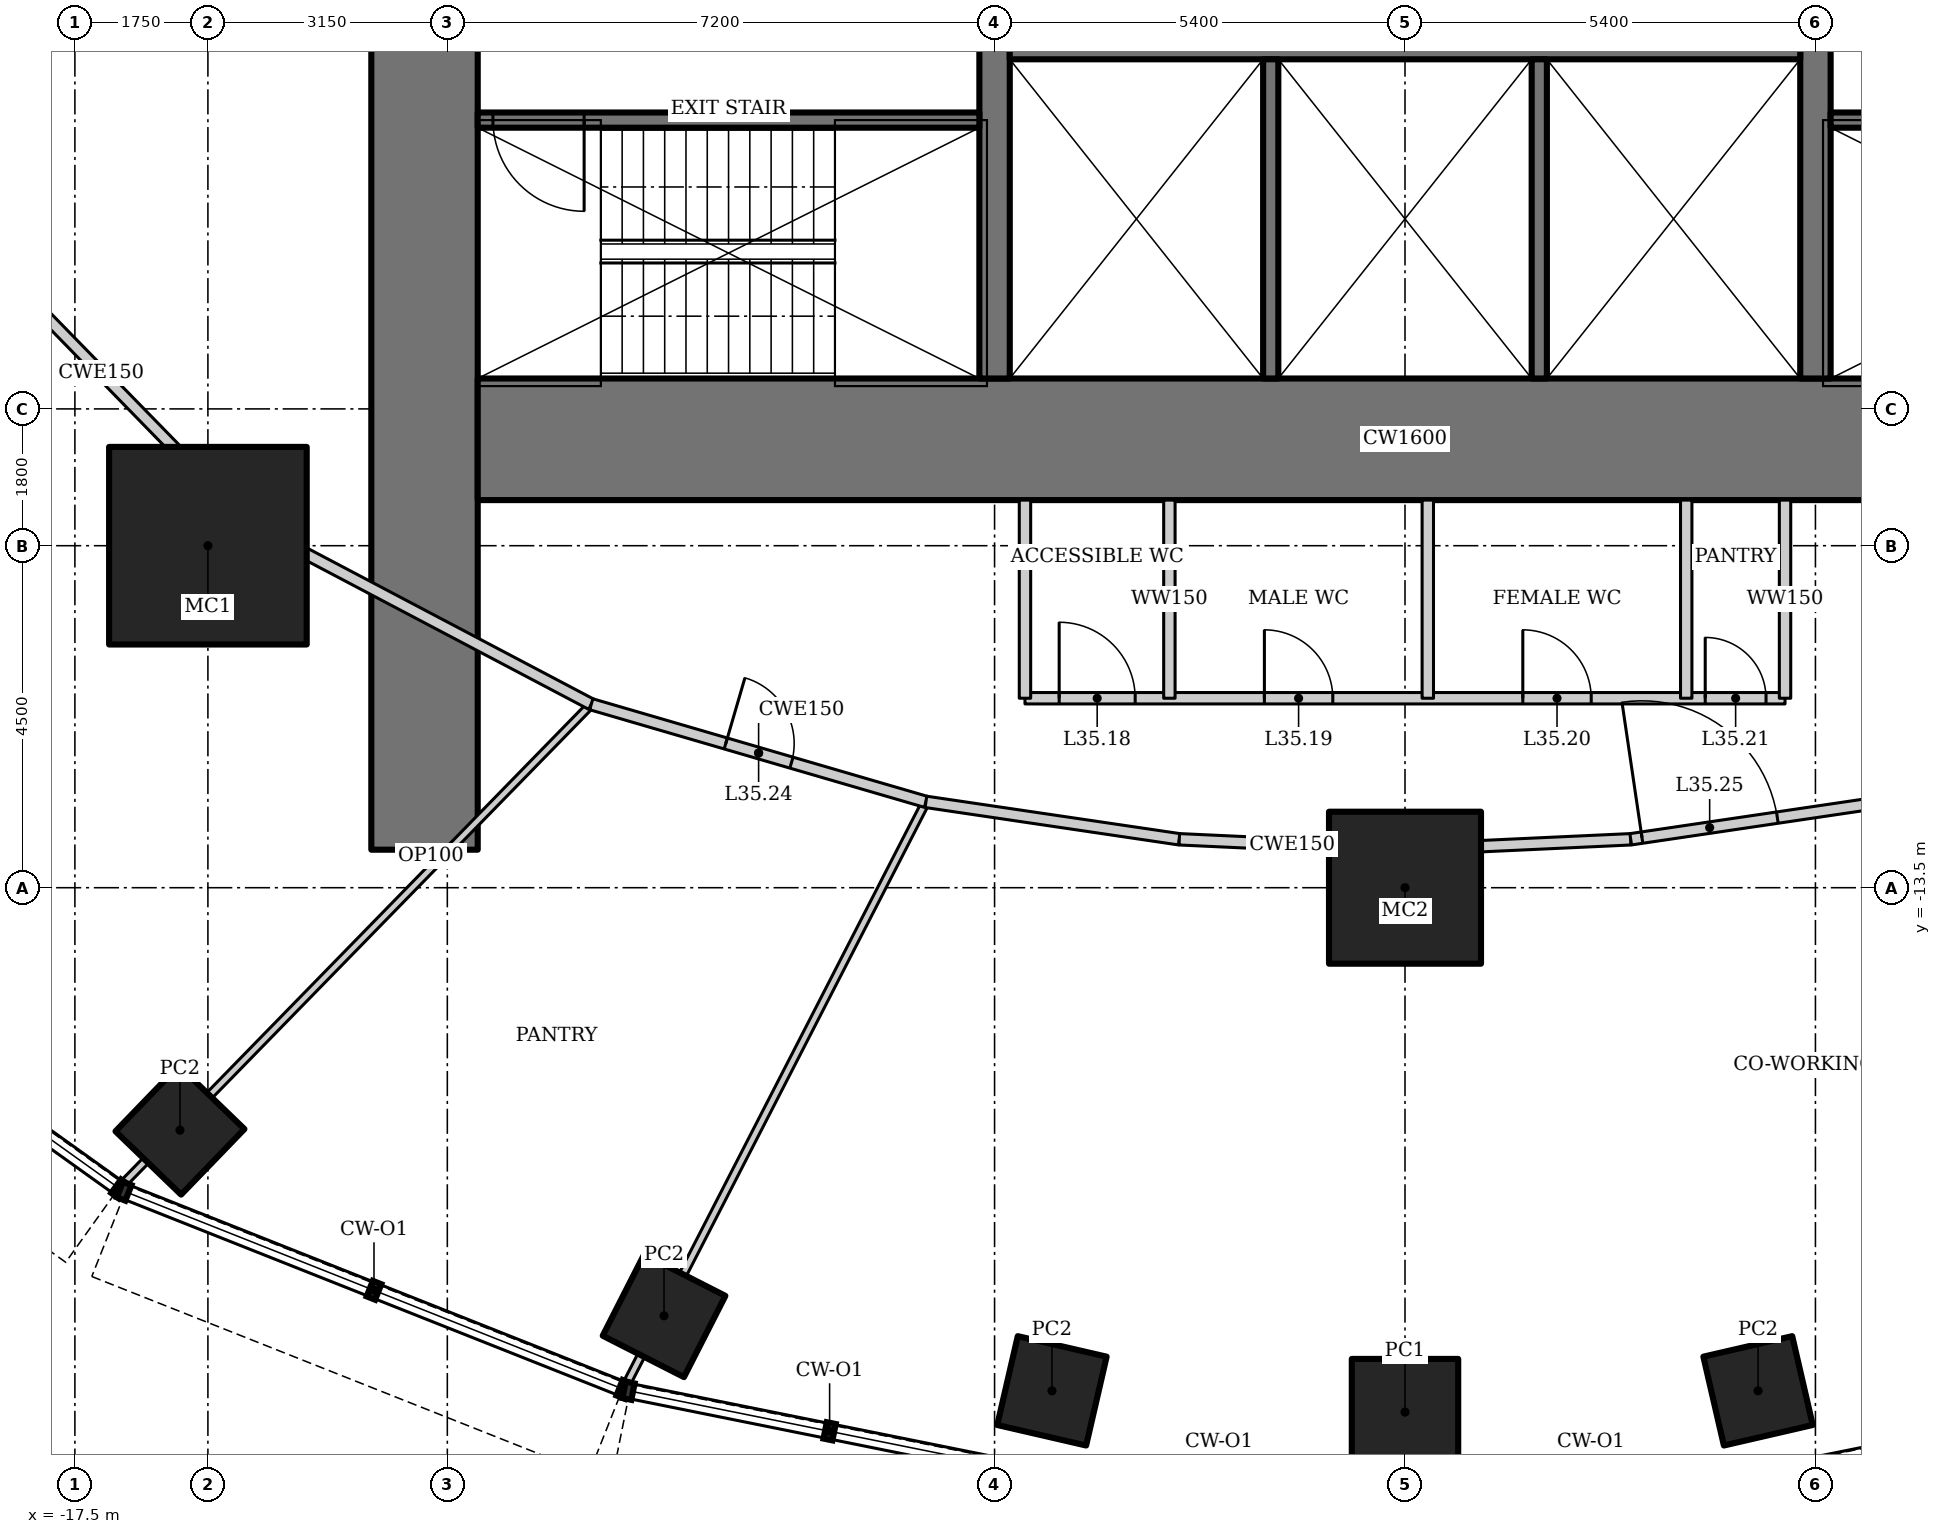
"""IFC4 building model, lengths in metres.
Left out: names, types, materials, properties, quantities, classifications, styles, units other than length and angle.
Written with IfcOpenShell. Run it as: python <this file> out.ifc"""

import sys

from ifc_helpers import new_model, si_unit, direction, frame, frame_2d, origin, origin_2d, place, context, subcontext, project, spatial, rectangle, hollow_rectangle, extrude, element, fill, save


model = new_model("IFC4")
c1 = context("Model", 3, precision=1e-05, world=origin(), true_north=direction((0.0, 1.0)))
c2 = subcontext(c1, "Body", "Model", "MODEL_VIEW")
j1 = project(units=[si_unit("LENGTHUNIT", "METRE"), si_unit("PLANEANGLEUNIT", "RADIAN")], contexts=[c1])
p1 = place(None, origin())
s1 = spatial("IfcSite", under=j1, at=p1, CompositionType="ELEMENT")
p2 = place(p1, origin())
s2 = spatial("IfcBuilding", under=s1, at=p2, CompositionType="ELEMENT")
p3 = place(p2, frame((0.0, 0.0, 151.0)))
s3 = spatial("IfcBuildingStorey", under=s2, at=p3, CompositionType="ELEMENT", Elevation=151.0)
p4 = place(p3, frame((-15.75, -9.0, 0.0), z_axis=(0.0, 0.0, 1.0), x_axis=(1.0, 0.0, 0.0)))
e1 = element("IfcColumn", 1, at=p4, inside=s3, PredefinedType="COLUMN", context=c2, shape_type="SweptSolid", body=[
    extrude(hollow_rectangle(XDim=2.6, YDim=2.6, WallThickness=0.13, at=origin_2d()), origin(), (0.0, 0.0, 1.0), 4.2),
])
p5 = place(p3, frame((0.0, -13.5, 0.0), z_axis=(0.0, 0.0, 1.0), x_axis=(1.0, 0.0, 0.0)))
e2 = element("IfcColumn", 2, at=p5, inside=s3, PredefinedType="COLUMN", context=c2, shape_type="SweptSolid", body=[
    extrude(hollow_rectangle(XDim=2.0, YDim=2.0, WallThickness=0.17, at=origin_2d()), origin(), (0.0, 0.0, 1.0), 4.2),
])
for number, where, z_axis, x_axis in (
    (3, (-16.118, -16.69, 0.0), (0.0, 0.0, 1.0), (0.695, 0.719, 0.0)),
    (4, (-9.749, -19.133, 0.0), (0.0, 0.0, 1.0), (0.454, 0.891, 0.0)),
    (5, (-4.645, -20.12, 0.0), (0.0, 0.0, 1.0), (0.225, 0.974, 0.0)),
):
    element("IfcColumn", number, at=place(p3, frame(where, z_axis=z_axis, x_axis=x_axis)), inside=s3, PredefinedType="COLUMN", context=c2, shape_type="SweptSolid", body=[
        extrude(hollow_rectangle(XDim=1.2, YDim=1.2, WallThickness=0.1, at=origin_2d()), origin(), (0.0, 0.0, 1.0), 4.2),
    ])
p6 = place(p3, frame((0.0, -20.4, 0.0), z_axis=(0.0, 0.0, 1.0), x_axis=(1.0, 0.0, 0.0)))
e6 = element("IfcColumn", 6, at=p6, inside=s3, PredefinedType="COLUMN", context=c2, shape_type="SweptSolid", body=[
    extrude(hollow_rectangle(XDim=1.4, YDim=1.4, WallThickness=0.1, at=origin_2d()), origin(), (0.0, 0.0, 1.0), 4.2),
])
p7 = place(p3, frame((4.645, -20.12, 0.0), z_axis=(0.0, 0.0, 1.0), x_axis=(0.974370064785, 0.224951054344, 0.0)))
e7 = element("IfcColumn", 7, at=p7, inside=s3, PredefinedType="COLUMN", context=c2, shape_type="SweptSolid", body=[
    extrude(hollow_rectangle(XDim=1.2, YDim=1.2, WallThickness=0.1, at=origin_2d()), origin(), (0.0, 0.0, 1.0), 4.2),
])
p8 = place(p3, frame((-12.9, 13.0, 0.0), z_axis=(0.0, 0.0, 1.0), x_axis=(0.0, -1.0, 0.0)))
e8 = element("IfcWall", 8, at=p8, inside=s3, PredefinedType="SHEAR", context=c2, shape_type="SweptSolid", body=[
    extrude(rectangle(XDim=26.0, YDim=1.4, at=frame_2d((13.0, 0.0))), origin(), (0.0, 0.0, 1.0), 4.2),
])
p9 = place(p8, frame((12.1, 0.0, 0.0)))
e9 = element("IfcOpeningElement", 9, at=p9, cuts=e8, PredefinedType="OPENING", context=c2, shape_type="SweptSolid", body=[
    extrude(rectangle(XDim=1.8, YDim=2.1, at=frame_2d((0.9, 1.05))), frame((0.0, 0.71, 0.0), z_axis=(0.0, -1.0, 0.0), x_axis=(1.0, 0.0, 0.0)), (0.0, 0.0, 1.0), 1.42),
])
p10 = place(p3, frame((-12.2, -7.6, 0.0), z_axis=(0.0, 0.0, 1.0), x_axis=(1.0, 0.0, 0.0)))
e10 = element("IfcWall", 10, at=p10, inside=s3, PredefinedType="SHEAR", context=c2, shape_type="SweptSolid", body=[
    extrude(rectangle(XDim=24.4, YDim=1.6, at=frame_2d((12.2, 0.0))), origin(), (0.0, 0.0, 1.0), 4.2),
])
p11 = place(p3, frame((5.4, -6.8, 0.0), z_axis=(0.0, 0.0, 1.0), x_axis=(0.0, 1.0, 0.0)))
e11 = element("IfcWall", 11, at=p11, inside=s3, PredefinedType="SHEAR", context=c2, shape_type="SweptSolid", body=[
    extrude(rectangle(XDim=13.6, YDim=0.4, at=frame_2d((6.8, 0.0))), origin(), (0.0, 0.0, 1.0), 4.2),
])
p12 = place(p11, frame((5.9, 0.0, 0.0)))
e12 = element("IfcOpeningElement", 12, at=p12, cuts=e11, PredefinedType="OPENING", context=c2, shape_type="SweptSolid", body=[
    extrude(rectangle(XDim=1.8, YDim=2.1, at=frame_2d((0.9, 1.05))), frame((0.0, 0.21, 0.0), z_axis=(0.0, -1.0, 0.0), x_axis=(1.0, 0.0, 0.0)), (0.0, 0.0, 1.0), 0.42),
])
p13 = place(p3, frame((-5.4, 6.8, 0.0), z_axis=(0.0, 0.0, 1.0), x_axis=(0.0, -1.0, 0.0)))
e13 = element("IfcWall", 13, at=p13, inside=s3, PredefinedType="SHEAR", context=c2, shape_type="SweptSolid", body=[
    extrude(rectangle(XDim=13.6, YDim=0.4, at=frame_2d((6.8, 0.0))), origin(), (0.0, 0.0, 1.0), 4.2),
])
p14 = place(p13, frame((5.9, 0.0, 0.0)))
e14 = element("IfcOpeningElement", 14, at=p14, cuts=e13, PredefinedType="OPENING", context=c2, shape_type="SweptSolid", body=[
    extrude(rectangle(XDim=1.8, YDim=2.1, at=frame_2d((0.9, 1.05))), frame((0.0, 0.21, 0.0), z_axis=(0.0, -1.0, 0.0), x_axis=(1.0, 0.0, 0.0)), (0.0, 0.0, 1.0), 0.42),
])
p15 = place(p3, frame((-5.2, -2.4, 0.0), z_axis=(0.0, 0.0, 1.0), x_axis=(1.0, 0.0, 0.0)))
e15 = element("IfcWall", 15, at=p15, inside=s3, PredefinedType="SHEAR", context=c2, shape_type="SweptSolid", body=[
    extrude(rectangle(XDim=10.4, YDim=0.4, at=frame_2d((5.2, 0.0))), origin(), (0.0, 0.0, 1.0), 4.2),
])
for number, where, z_axis, x_axis in (
    (16, (-1.767, -2.6, 0.0), (0.0, 0.0, 1.0), (0.0, -1.0, 0.0)),
    (17, (1.767, -2.6, 0.0), (0.0, 0.0, 1.0), (0.0, -1.0, 0.0)),
):
    element("IfcWall", number, at=place(p3, frame(where, z_axis=z_axis, x_axis=x_axis)), inside=s3, PredefinedType="SOLIDWALL", context=c2, shape_type="SweptSolid", body=[
        extrude(rectangle(XDim=4.2, YDim=0.2, at=frame_2d((2.1, 0.0))), origin(), (0.0, 0.0, 1.0), 4.2),
    ])
p16 = place(p3, frame((5.6, -3.4, 0.0), z_axis=(0.0, 0.0, 1.0), x_axis=(1.0, 0.0, 0.0)))
e18 = element("IfcWall", 18, at=p16, inside=s3, PredefinedType="SHEAR", context=c2, shape_type="SweptSolid", body=[
    extrude(rectangle(XDim=6.6, YDim=0.2, at=frame_2d((3.3, 0.0))), origin(), (0.0, 0.0, 1.0), 4.2),
])
p17 = place(p16, frame((5.2, 0.0, 0.0)))
e19 = element("IfcOpeningElement", 19, at=p17, cuts=e18, PredefinedType="OPENING", context=c2, shape_type="SweptSolid", body=[
    extrude(rectangle(XDim=1.2, YDim=2.1, at=frame_2d((0.6, 1.05))), frame((0.0, 0.11, 0.0), z_axis=(0.0, -1.0, 0.0), x_axis=(1.0, 0.0, 0.0)), (0.0, 0.0, 1.0), 0.22),
])
p18 = place(p3, frame((-5.6, -3.4, 0.0), z_axis=(0.0, 0.0, 1.0), x_axis=(-1.0, 0.0, 0.0)))
e20 = element("IfcWall", 20, at=p18, inside=s3, PredefinedType="SHEAR", context=c2, shape_type="SweptSolid", body=[
    extrude(rectangle(XDim=6.6, YDim=0.2, at=frame_2d((3.3, 0.0))), origin(), (0.0, 0.0, 1.0), 4.2),
])
p19 = place(p18, frame((5.2, 0.0, 0.0)))
e21 = element("IfcOpeningElement", 21, at=p19, cuts=e20, PredefinedType="OPENING", context=c2, shape_type="SweptSolid", body=[
    extrude(rectangle(XDim=1.2, YDim=2.1, at=frame_2d((0.6, 1.05))), frame((0.0, 0.11, 0.0), z_axis=(0.0, -1.0, 0.0), x_axis=(1.0, 0.0, 0.0)), (0.0, 0.0, 1.0), 0.22),
])
p20 = place(p3, frame((-16.882, -17.414, 0.0), z_axis=(0.0, 0.0, 1.0), x_axis=(0.698509457669, 0.715600822769, 0.0)))
e22 = element("IfcWall", 22, at=p20, inside=s3, PredefinedType="PARTITIONING", context=c2, shape_type="SweptSolid", body=[
    extrude(rectangle(XDim=8.842, YDim=0.1, at=frame_2d((4.421, 0.0))), origin(), (0.0, 0.0, 1.0), 3.321),
])
p21 = place(p3, frame((-10.253, -20.052, 0.0), z_axis=(0.0, 0.0, 1.0), x_axis=(0.457326298316, 0.88929896934, 0.0)))
e23 = element("IfcWall", 23, at=p21, inside=s3, PredefinedType="PARTITIONING", context=c2, shape_type="SweptSolid", body=[
    extrude(rectangle(XDim=8.638, YDim=0.1, at=frame_2d((4.319, 0.0))), origin(), (0.0, 0.0, 1.0), 3.349),
])
p22 = place(p3, frame((-19.078, -4.757, 0.0), z_axis=(0.0, 0.0, 1.0), x_axis=(0.698305033542, -0.715800307439, 0.0)))
e24 = element("IfcWall", 24, at=p22, inside=s3, PredefinedType="PARTITIONING", context=c2, shape_type="SweptSolid", body=[
    extrude(rectangle(XDim=5.512, YDim=0.15, at=frame_2d((2.756, 0.0))), origin(), (0.0, 0.0, 1.0), 4.05),
])
p23 = place(p22, frame((0.15, 0.0, 0.0)))
e25 = element("IfcOpeningElement", 25, at=p23, cuts=e24, PredefinedType="OPENING", context=c2, shape_type="SweptSolid", body=[
    extrude(rectangle(XDim=0.9, YDim=2.1, at=frame_2d((0.45, 1.05))), frame((0.0, 0.085, 0.0), z_axis=(0.0, -1.0, 0.0), x_axis=(1.0, 0.0, 0.0)), (0.0, 0.0, 1.0), 0.17),
])
p24 = place(p3, frame((-15.229, -8.702, 0.0), z_axis=(0.0, 0.0, 1.0), x_axis=(0.884643590306, -0.466267860924, 0.0)))
e26 = element("IfcWall", 26, at=p24, inside=s3, PredefinedType="PARTITIONING", context=c2, shape_type="SweptSolid", body=[
    extrude(rectangle(XDim=5.113, YDim=0.15, at=frame_2d((2.557, 0.0))), origin(), (0.0, 0.0, 1.0), 4.05),
])
p25 = place(p3, frame((-10.706, -11.086, 0.0), z_axis=(0.0, 0.0, 1.0), x_axis=(0.96001728753, -0.279940721659, 0.0)))
e27 = element("IfcWall", 27, at=p25, inside=s3, PredefinedType="PARTITIONING", context=c2, shape_type="SweptSolid", body=[
    extrude(rectangle(XDim=4.586, YDim=0.15, at=frame_2d((2.293, 0.0))), origin(), (0.0, 0.0, 1.0), 4.05),
])
p26 = place(p25, frame((1.843, 0.0, 0.0)))
e28 = element("IfcOpeningElement", 28, at=p26, cuts=e27, PredefinedType="OPENING", context=c2, shape_type="SweptSolid", body=[
    extrude(rectangle(XDim=0.9, YDim=2.1, at=frame_2d((0.45, 1.05))), frame((0.0, 0.085, 0.0), z_axis=(0.0, -1.0, 0.0), x_axis=(1.0, 0.0, 0.0)), (0.0, 0.0, 1.0), 0.17),
])
p27 = place(p3, frame((-6.303, -12.37, 0.0), z_axis=(0.0, 0.0, 1.0), x_axis=(0.989262902935, -0.146146874329, 0.0)))
e29 = element("IfcWall", 29, at=p27, inside=s3, PredefinedType="PARTITIONING", context=c2, shape_type="SweptSolid", body=[
    extrude(rectangle(XDim=3.369, YDim=0.15, at=frame_2d((1.685, 0.0))), origin(), (0.0, 0.0, 1.0), 4.05),
])
for number, where, z_axis, x_axis in (
    (30, (-2.97, -12.863, 0.0), (0.0, 0.0, 1.0), (0.999, -0.046, 0.0)),
    (31, (0.0, -13.0, 0.0), (0.0, 0.0, 1.0), (0.999, 0.046, 0.0)),
):
    element("IfcWall", number, at=place(p3, frame(where, z_axis=z_axis, x_axis=x_axis)), inside=s3, PredefinedType="PARTITIONING", context=c2, shape_type="SweptSolid", body=[
        extrude(rectangle(XDim=2.973, YDim=0.15, at=frame_2d((1.486, 0.0))), origin(), (0.0, 0.0, 1.0), 4.05),
    ])
p28 = place(p3, frame((2.97, -12.863, 0.0), z_axis=(0.0, 0.0, 1.0), x_axis=(0.989262902935, 0.146146874329, 0.0)))
e32 = element("IfcWall", 32, at=p28, inside=s3, PredefinedType="PARTITIONING", context=c2, shape_type="SweptSolid", body=[
    extrude(rectangle(XDim=3.369, YDim=0.15, at=frame_2d((1.685, 0.0))), origin(), (0.0, 0.0, 1.0), 4.05),
])
p29 = place(p28, frame((0.15, 0.0, 0.0)))
e33 = element("IfcOpeningElement", 33, at=p29, cuts=e32, PredefinedType="OPENING", context=c2, shape_type="SweptSolid", body=[
    extrude(rectangle(XDim=1.8, YDim=2.1, at=frame_2d((0.9, 1.05))), frame((0.0, 0.085, 0.0), z_axis=(0.0, -1.0, 0.0), x_axis=(1.0, 0.0, 0.0)), (0.0, 0.0, 1.0), 0.17),
])
p30 = place(p3, frame((-5.0, -11.007, 0.0), z_axis=(0.0, 0.0, 1.0), x_axis=(1.0, 0.0, 0.0)))
e34 = element("IfcWall", 34, at=p30, inside=s3, PredefinedType="SOLIDWALL", context=c2, shape_type="SweptSolid", body=[
    extrude(rectangle(XDim=10.0, YDim=0.15, at=frame_2d((5.0, 0.0))), origin(), (0.0, 0.0, 1.0), 4.05),
])
p31 = place(p30, frame((0.45, 0.0, 0.0)))
e35 = element("IfcOpeningElement", 35, at=p31, cuts=e34, PredefinedType="OPENING", context=c2, shape_type="SweptSolid", body=[
    extrude(rectangle(XDim=1.0, YDim=2.1, at=frame_2d((0.5, 1.05))), frame((0.0, 0.085, 0.0), z_axis=(0.0, -1.0, 0.0), x_axis=(1.0, 0.0, 0.0)), (0.0, 0.0, 1.0), 0.17),
])
p32 = place(p30, frame((3.15, 0.0, 0.0)))
e36 = element("IfcOpeningElement", 36, at=p32, cuts=e34, PredefinedType="OPENING", context=c2, shape_type="SweptSolid", body=[
    extrude(rectangle(XDim=0.9, YDim=2.1, at=frame_2d((0.45, 1.05))), frame((0.0, 0.085, 0.0), z_axis=(0.0, -1.0, 0.0), x_axis=(1.0, 0.0, 0.0)), (0.0, 0.0, 1.0), 0.17),
])
p33 = place(p30, frame((6.55, 0.0, 0.0)))
e37 = element("IfcOpeningElement", 37, at=p33, cuts=e34, PredefinedType="OPENING", context=c2, shape_type="SweptSolid", body=[
    extrude(rectangle(XDim=0.9, YDim=2.1, at=frame_2d((0.45, 1.05))), frame((0.0, 0.085, 0.0), z_axis=(0.0, -1.0, 0.0), x_axis=(1.0, 0.0, 0.0)), (0.0, 0.0, 1.0), 0.17),
])
p34 = place(p30, frame((8.95, 0.0, 0.0)))
e38 = element("IfcOpeningElement", 38, at=p34, cuts=e34, PredefinedType="OPENING", context=c2, shape_type="SweptSolid", body=[
    extrude(rectangle(XDim=0.8, YDim=2.1, at=frame_2d((0.4, 1.05))), frame((0.0, 0.085, 0.0), z_axis=(0.0, -1.0, 0.0), x_axis=(1.0, 0.0, 0.0)), (0.0, 0.0, 1.0), 0.17),
])
for number, where, z_axis, x_axis in (
    (39, (-5.0, -8.4, 0.0), (0.0, 0.0, 1.0), (0.0, -1.0, 0.0)),
    (40, (5.0, -8.4, 0.0), (0.0, 0.0, 1.0), (0.0, -1.0, 0.0)),
    (41, (-3.1, -8.4, 0.0), (0.0, 0.0, 1.0), (0.0, -1.0, 0.0)),
    (42, (0.3, -8.4, 0.0), (0.0, 0.0, 1.0), (0.0, -1.0, 0.0)),
    (43, (3.7, -8.4, 0.0), (0.0, 0.0, 1.0), (0.0, -1.0, 0.0)),
):
    element("IfcWall", number, at=place(p3, frame(where, z_axis=z_axis, x_axis=x_axis)), inside=s3, PredefinedType="SOLIDWALL", context=c2, shape_type="SweptSolid", body=[
        extrude(rectangle(XDim=2.607, YDim=0.15, at=frame_2d((1.304, 0.0))), origin(), (0.0, 0.0, 1.0), 4.05),
    ])
p35 = place(p3, frame((-12.9, -13.0, 0.0), z_axis=(0.0, 0.0, 1.0), x_axis=(0.715424812506, -0.698689729172, 0.0)))
e44 = element("IfcWall", 44, at=p35, inside=s3, PredefinedType="PARTITIONING", context=c2, shape_type="SweptSolid", body=[
    extrude(rectangle(XDim=0.233, YDim=0.1, at=frame_2d((0.117, 0.0))), origin(), (0.0, 0.0, 1.0), 4.05),
])
p36 = place(p19, origin())
e45 = element("IfcDoor", 45, at=p36, inside=s3, OperationType="SINGLE_SWING_RIGHT", PredefinedType="DOOR", context=c2, shape_type="SweptSolid", body=[
    extrude(rectangle(XDim=1.2, YDim=2.1, at=frame_2d((0.6, 1.05))), frame((0.0, 0.025, 0.0), z_axis=(0.0, -1.0, 0.0), x_axis=(1.0, 0.0, 0.0)), (0.0, 0.0, 1.0), 0.05),
])
fill(e21, e45)
p37 = place(p31, origin())
e46 = element("IfcDoor", 46, at=p37, inside=s3, OperationType="SINGLE_SWING_LEFT", PredefinedType="DOOR", context=c2, shape_type="SweptSolid", body=[
    extrude(rectangle(XDim=1.0, YDim=2.1, at=frame_2d((0.5, 1.05))), frame((0.0, 0.025, 0.0), z_axis=(0.0, -1.0, 0.0), x_axis=(1.0, 0.0, 0.0)), (0.0, 0.0, 1.0), 0.05),
])
fill(e35, e46)
p38 = place(p32, origin())
e47 = element("IfcDoor", 47, at=p38, inside=s3, OperationType="SINGLE_SWING_LEFT", PredefinedType="DOOR", context=c2, shape_type="SweptSolid", body=[
    extrude(rectangle(XDim=0.9, YDim=2.1, at=frame_2d((0.45, 1.05))), frame((0.0, 0.025, 0.0), z_axis=(0.0, -1.0, 0.0), x_axis=(1.0, 0.0, 0.0)), (0.0, 0.0, 1.0), 0.05),
])
fill(e36, e47)
p39 = place(p33, origin())
e48 = element("IfcDoor", 48, at=p39, inside=s3, OperationType="SINGLE_SWING_LEFT", PredefinedType="DOOR", context=c2, shape_type="SweptSolid", body=[
    extrude(rectangle(XDim=0.9, YDim=2.1, at=frame_2d((0.45, 1.05))), frame((0.0, 0.025, 0.0), z_axis=(0.0, -1.0, 0.0), x_axis=(1.0, 0.0, 0.0)), (0.0, 0.0, 1.0), 0.05),
])
fill(e37, e48)
p40 = place(p34, origin())
e49 = element("IfcDoor", 49, at=p40, inside=s3, OperationType="SINGLE_SWING_LEFT", PredefinedType="DOOR", context=c2, shape_type="SweptSolid", body=[
    extrude(rectangle(XDim=0.8, YDim=2.1, at=frame_2d((0.4, 1.05))), frame((0.0, 0.025, 0.0), z_axis=(0.0, -1.0, 0.0), x_axis=(1.0, 0.0, 0.0)), (0.0, 0.0, 1.0), 0.05),
])
fill(e38, e49)
p41 = place(p26, origin())
e50 = element("IfcDoor", 50, at=p41, inside=s3, OperationType="SINGLE_SWING_LEFT", PredefinedType="DOOR", context=c2, shape_type="SweptSolid", body=[
    extrude(rectangle(XDim=0.9, YDim=2.1, at=frame_2d((0.45, 1.05))), frame((0.0, 0.025, 0.0), z_axis=(0.0, -1.0, 0.0), x_axis=(1.0, 0.0, 0.0)), (0.0, 0.0, 1.0), 0.05),
])
fill(e28, e50)
p42 = place(p29, origin())
e51 = element("IfcDoor", 51, at=p42, inside=s3, OperationType="DOUBLE_DOOR_DOUBLE_SWING", PredefinedType="DOOR", context=c2, shape_type="SweptSolid", body=[
    extrude(rectangle(XDim=1.8, YDim=2.1, at=frame_2d((0.9, 1.05))), frame((0.0, 0.025, 0.0), z_axis=(0.0, -1.0, 0.0), x_axis=(1.0, 0.0, 0.0)), (0.0, 0.0, 1.0), 0.05),
])
fill(e33, e51)
save(model, sys.argv[1])
